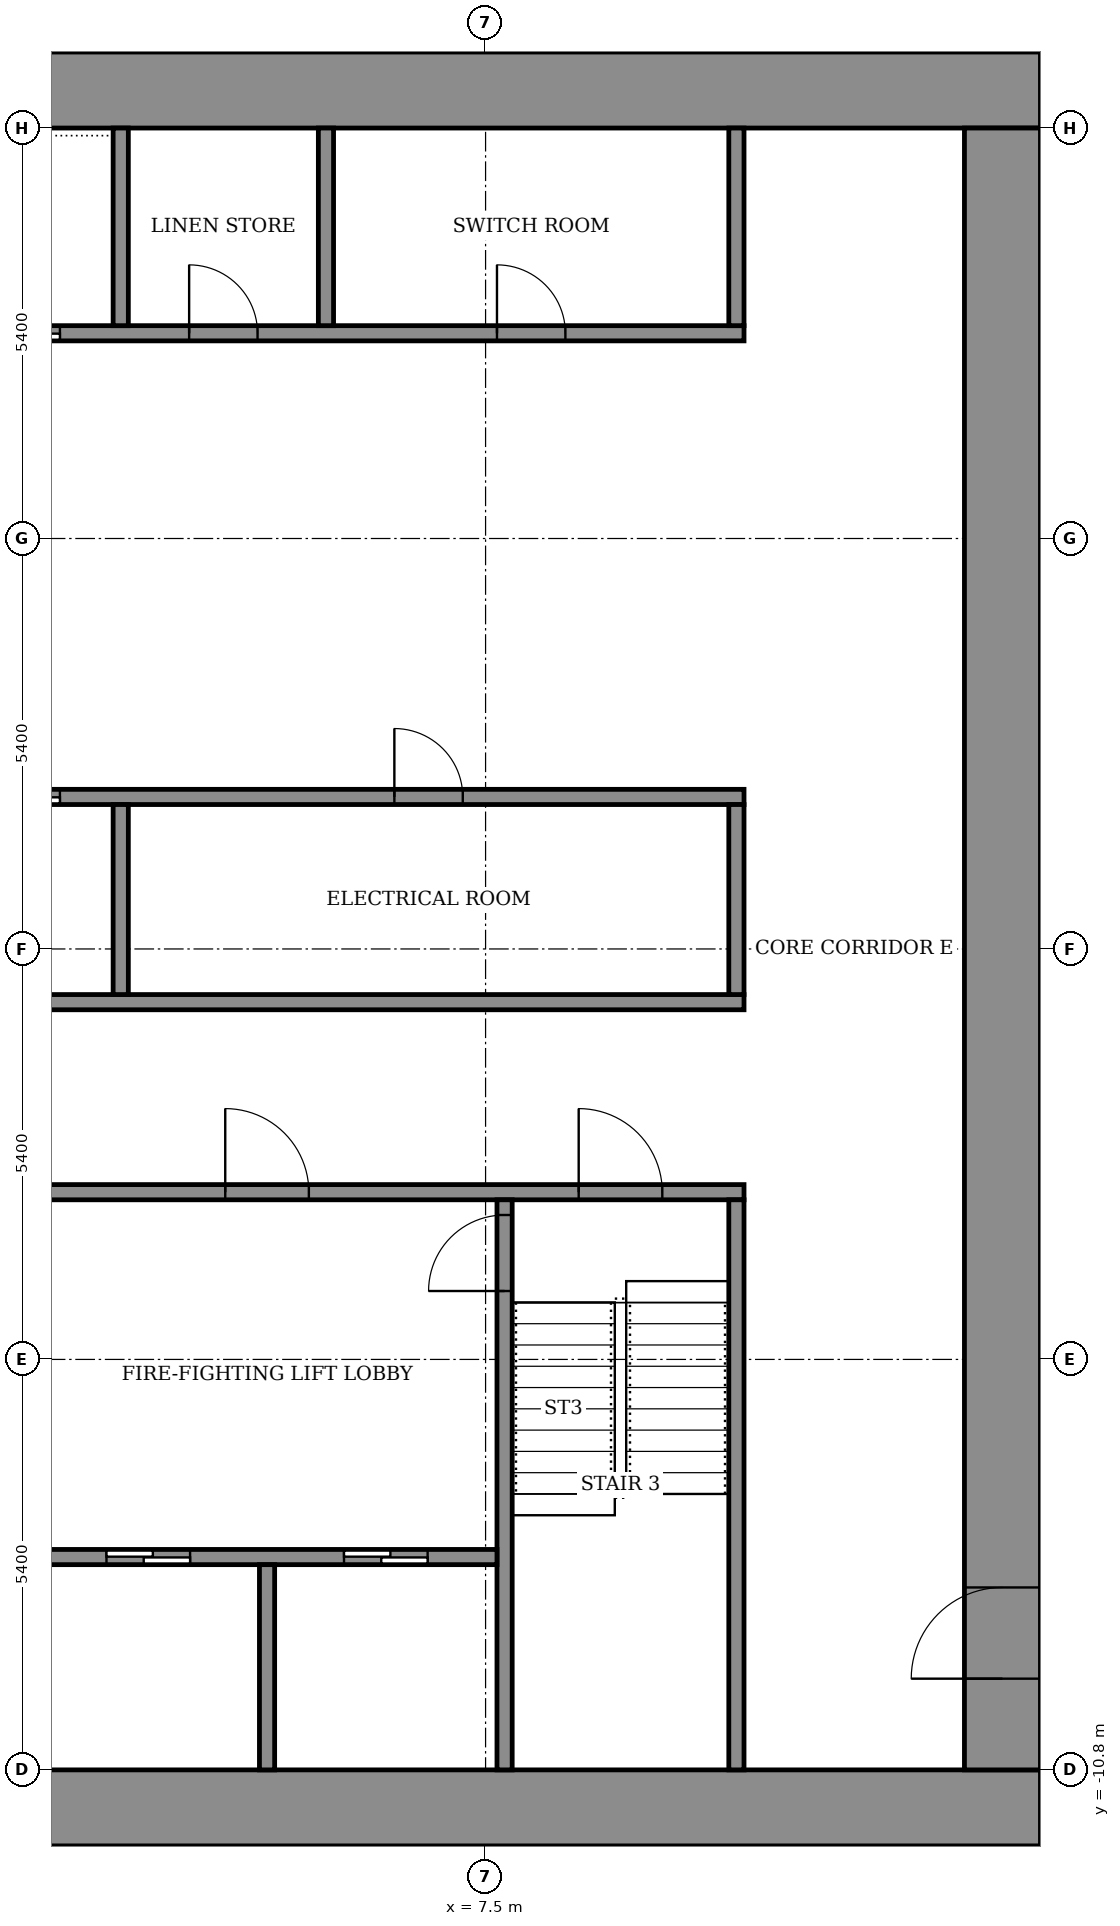
"""IFC4 building model, lengths in metres.
Left out: names, types, materials, properties, quantities, classifications, styles, units other than length and angle.
Written with IfcOpenShell. Run it as: python <this file> out.ifc"""

import sys

from ifc_helpers import new_model, si_unit, direction, frame, frame_2d, origin, place, context, subcontext, project, spatial, rectangle, extrude, element, fill, save


model = new_model("IFC4")
c1 = context("Model", 3, precision=1e-05, world=origin(), true_north=direction((0.0, 1.0)))
c2 = subcontext(c1, "Body", "Model", "MODEL_VIEW")
j1 = project(units=[si_unit("LENGTHUNIT", "METRE"), si_unit("PLANEANGLEUNIT", "RADIAN")], contexts=[c1])
p1 = place(None, origin())
s1 = spatial("IfcSite", under=j1, at=p1, CompositionType="ELEMENT")
p2 = place(p1, origin())
s2 = spatial("IfcBuilding", under=s1, at=p2, CompositionType="ELEMENT")
p3 = place(p2, frame((0.0, 0.0, 109.1)))
s3 = spatial("IfcBuildingStorey", under=s2, at=p3, CompositionType="ELEMENT", Elevation=109.1)
for number, where, z_axis, x_axis in (
    (1, (-14.8, -11.3, 0.0), (0.0, 0.0, 1.0), (1.0, 0.0, 0.0)),
    (2, (-14.8, 11.3, 0.0), (0.0, 0.0, 1.0), (1.0, 0.0, 0.0)),
):
    element("IfcWall", number, at=place(p3, frame(where, z_axis=z_axis, x_axis=x_axis)), inside=s3, PredefinedType="SHEAR", context=c2, shape_type="SweptSolid", body=[
        extrude(rectangle(XDim=29.6, YDim=1.0, at=frame_2d((14.8, 0.0))), origin(), (0.0, 0.0, 1.0), 3.6),
    ])
p4 = place(p3, frame((14.3, -10.8, 0.0), z_axis=(0.0, 0.0, 1.0), x_axis=(0.0, 1.0, 0.0)))
e3 = element("IfcWall", 3, at=p4, inside=s3, PredefinedType="SHEAR", context=c2, shape_type="SweptSolid", body=[
    extrude(rectangle(XDim=21.6, YDim=1.0, at=frame_2d((10.8, 0.0))), origin(), (0.0, 0.0, 1.0), 3.6),
])
p5 = place(p4, frame((1.2, 0.0, 0.0)))
e4 = element("IfcOpeningElement", 4, at=p5, cuts=e3, PredefinedType="OPENING", context=c2, shape_type="SweptSolid", body=[
    extrude(rectangle(XDim=1.2, YDim=2.1, at=frame_2d((0.6, 1.05))), frame((0.0, 0.51, 0.0), z_axis=(0.0, -1.0, 0.0), x_axis=(1.0, 0.0, 0.0)), (0.0, 0.0, 1.0), 1.02),
])
p6 = place(p3, frame((-10.9, -3.2, 0.0), z_axis=(0.0, 0.0, 1.0), x_axis=(1.0, 0.0, 0.0)))
e5 = element("IfcWall", 5, at=p6, inside=s3, PredefinedType="SHEAR", context=c2, shape_type="SweptSolid", body=[
    extrude(rectangle(XDim=21.8, YDim=0.2, at=frame_2d((10.9, 0.0))), origin(), (0.0, 0.0, 1.0), 3.05),
])
p7 = place(p6, frame((1.075, 0.0, 0.0)))
e6 = element("IfcOpeningElement", 6, at=p7, cuts=e5, PredefinedType="OPENING", context=c2, shape_type="SweptSolid", body=[
    extrude(rectangle(XDim=1.1, YDim=2.1, at=frame_2d((0.55, 1.05))), frame((0.0, 0.11, 0.0), z_axis=(0.0, -1.0, 0.0), x_axis=(1.0, 0.0, 0.0)), (0.0, 0.0, 1.0), 0.22),
])
p8 = place(p6, frame((10.325, 0.0, 0.0)))
e7 = element("IfcOpeningElement", 7, at=p8, cuts=e5, PredefinedType="OPENING", context=c2, shape_type="SweptSolid", body=[
    extrude(rectangle(XDim=1.1, YDim=2.1, at=frame_2d((0.55, 1.05))), frame((0.0, 0.11, 0.0), z_axis=(0.0, -1.0, 0.0), x_axis=(1.0, 0.0, 0.0)), (0.0, 0.0, 1.0), 0.22),
])
p9 = place(p6, frame((19.625, 0.0, 0.0)))
e8 = element("IfcOpeningElement", 8, at=p9, cuts=e5, PredefinedType="OPENING", context=c2, shape_type="SweptSolid", body=[
    extrude(rectangle(XDim=1.1, YDim=2.1, at=frame_2d((0.55, 1.05))), frame((0.0, 0.11, 0.0), z_axis=(0.0, -1.0, 0.0), x_axis=(1.0, 0.0, 0.0)), (0.0, 0.0, 1.0), 0.22),
])
p10 = place(p6, frame((5.7, 0.0, 0.0)))
e9 = element("IfcOpeningElement", 9, at=p10, cuts=e5, PredefinedType="OPENING", context=c2, shape_type="SweptSolid", body=[
    extrude(rectangle(XDim=1.1, YDim=2.1, at=frame_2d((0.55, 1.05))), frame((0.0, 0.11, 0.0), z_axis=(0.0, -1.0, 0.0), x_axis=(1.0, 0.0, 0.0)), (0.0, 0.0, 1.0), 0.22),
])
p11 = place(p6, frame((14.975, 0.0, 0.0)))
e10 = element("IfcOpeningElement", 10, at=p11, cuts=e5, PredefinedType="OPENING", context=c2, shape_type="SweptSolid", body=[
    extrude(rectangle(XDim=1.1, YDim=2.1, at=frame_2d((0.55, 1.05))), frame((0.0, 0.11, 0.0), z_axis=(0.0, -1.0, 0.0), x_axis=(1.0, 0.0, 0.0)), (0.0, 0.0, 1.0), 0.22),
])
p12 = place(p3, frame((-10.9, -0.7, 0.0), z_axis=(0.0, 0.0, 1.0), x_axis=(1.0, 0.0, 0.0)))
e11 = element("IfcWall", 11, at=p12, inside=s3, PredefinedType="SHEAR", context=c2, shape_type="SweptSolid", body=[
    extrude(rectangle(XDim=21.8, YDim=0.2, at=frame_2d((10.9, 0.0))), origin(), (0.0, 0.0, 1.0), 3.05),
])
p13 = place(p3, frame((-10.9, 2.0, 0.0), z_axis=(0.0, 0.0, 1.0), x_axis=(1.0, 0.0, 0.0)))
e12 = element("IfcWall", 12, at=p13, inside=s3, PredefinedType="SHEAR", context=c2, shape_type="SweptSolid", body=[
    extrude(rectangle(XDim=21.8, YDim=0.2, at=frame_2d((10.9, 0.0))), origin(), (0.0, 0.0, 1.0), 3.05),
])
p14 = place(p13, frame((0.9, 0.0, 0.0)))
e13 = element("IfcOpeningElement", 13, at=p14, cuts=e12, PredefinedType="OPENING", context=c2, shape_type="SweptSolid", body=[
    extrude(rectangle(XDim=1.1, YDim=2.1, at=frame_2d((0.55, 1.05))), frame((0.0, 0.11, 0.0), z_axis=(0.0, -1.0, 0.0), x_axis=(1.0, 0.0, 0.0)), (0.0, 0.0, 1.0), 0.22),
])
p15 = place(p13, frame((3.6, 0.0, 0.0)))
e14 = element("IfcOpeningElement", 14, at=p15, cuts=e12, PredefinedType="OPENING", context=c2, shape_type="SweptSolid", body=[
    extrude(rectangle(XDim=1.1, YDim=2.1, at=frame_2d((0.55, 1.05))), frame((0.0, 0.11, 0.0), z_axis=(0.0, -1.0, 0.0), x_axis=(1.0, 0.0, 0.0)), (0.0, 0.0, 1.0), 0.22),
])
p16 = place(p13, frame((6.3, 0.0, 0.0)))
e15 = element("IfcOpeningElement", 15, at=p16, cuts=e12, PredefinedType="OPENING", context=c2, shape_type="SweptSolid", body=[
    extrude(rectangle(XDim=1.1, YDim=2.1, at=frame_2d((0.55, 1.05))), frame((0.0, 0.11, 0.0), z_axis=(0.0, -1.0, 0.0), x_axis=(1.0, 0.0, 0.0)), (0.0, 0.0, 1.0), 0.22),
])
p17 = place(p13, frame((9.0, 0.0, 0.0)))
e16 = element("IfcOpeningElement", 16, at=p17, cuts=e12, PredefinedType="OPENING", context=c2, shape_type="SweptSolid", body=[
    extrude(rectangle(XDim=1.1, YDim=2.1, at=frame_2d((0.55, 1.05))), frame((0.0, 0.11, 0.0), z_axis=(0.0, -1.0, 0.0), x_axis=(1.0, 0.0, 0.0)), (0.0, 0.0, 1.0), 0.22),
])
p18 = place(p13, frame((11.7, 0.0, 0.0)))
e17 = element("IfcOpeningElement", 17, at=p18, cuts=e12, PredefinedType="OPENING", context=c2, shape_type="SweptSolid", body=[
    extrude(rectangle(XDim=1.1, YDim=2.1, at=frame_2d((0.55, 1.05))), frame((0.0, 0.11, 0.0), z_axis=(0.0, -1.0, 0.0), x_axis=(1.0, 0.0, 0.0)), (0.0, 0.0, 1.0), 0.22),
])
p19 = place(p13, frame((17.2, 0.0, 0.0)))
e18 = element("IfcOpeningElement", 18, at=p19, cuts=e12, PredefinedType="OPENING", context=c2, shape_type="SweptSolid", body=[
    extrude(rectangle(XDim=0.9, YDim=2.1, at=frame_2d((0.45, 1.05))), frame((0.0, 0.11, 0.0), z_axis=(0.0, -1.0, 0.0), x_axis=(1.0, 0.0, 0.0)), (0.0, 0.0, 1.0), 0.22),
])
p20 = place(p3, frame((-10.9, 8.1, 0.0), z_axis=(0.0, 0.0, 1.0), x_axis=(1.0, 0.0, 0.0)))
e19 = element("IfcWall", 19, at=p20, inside=s3, PredefinedType="SHEAR", context=c2, shape_type="SweptSolid", body=[
    extrude(rectangle(XDim=21.8, YDim=0.2, at=frame_2d((10.9, 0.0))), origin(), (0.0, 0.0, 1.0), 3.05),
])
p21 = place(p20, frame((0.9, 0.0, 0.0)))
e20 = element("IfcOpeningElement", 20, at=p21, cuts=e19, PredefinedType="OPENING", context=c2, shape_type="SweptSolid", body=[
    extrude(rectangle(XDim=1.1, YDim=2.1, at=frame_2d((0.55, 1.05))), frame((0.0, 0.11, 0.0), z_axis=(0.0, -1.0, 0.0), x_axis=(1.0, 0.0, 0.0)), (0.0, 0.0, 1.0), 0.22),
])
p22 = place(p20, frame((3.6, 0.0, 0.0)))
e21 = element("IfcOpeningElement", 21, at=p22, cuts=e19, PredefinedType="OPENING", context=c2, shape_type="SweptSolid", body=[
    extrude(rectangle(XDim=1.1, YDim=2.1, at=frame_2d((0.55, 1.05))), frame((0.0, 0.11, 0.0), z_axis=(0.0, -1.0, 0.0), x_axis=(1.0, 0.0, 0.0)), (0.0, 0.0, 1.0), 0.22),
])
p23 = place(p20, frame((6.3, 0.0, 0.0)))
e22 = element("IfcOpeningElement", 22, at=p23, cuts=e19, PredefinedType="OPENING", context=c2, shape_type="SweptSolid", body=[
    extrude(rectangle(XDim=1.1, YDim=2.1, at=frame_2d((0.55, 1.05))), frame((0.0, 0.11, 0.0), z_axis=(0.0, -1.0, 0.0), x_axis=(1.0, 0.0, 0.0)), (0.0, 0.0, 1.0), 0.22),
])
p24 = place(p20, frame((9.0, 0.0, 0.0)))
e23 = element("IfcOpeningElement", 23, at=p24, cuts=e19, PredefinedType="OPENING", context=c2, shape_type="SweptSolid", body=[
    extrude(rectangle(XDim=1.1, YDim=2.1, at=frame_2d((0.55, 1.05))), frame((0.0, 0.11, 0.0), z_axis=(0.0, -1.0, 0.0), x_axis=(1.0, 0.0, 0.0)), (0.0, 0.0, 1.0), 0.22),
])
p25 = place(p20, frame((11.7, 0.0, 0.0)))
e24 = element("IfcOpeningElement", 24, at=p25, cuts=e19, PredefinedType="OPENING", context=c2, shape_type="SweptSolid", body=[
    extrude(rectangle(XDim=1.1, YDim=2.1, at=frame_2d((0.55, 1.05))), frame((0.0, 0.11, 0.0), z_axis=(0.0, -1.0, 0.0), x_axis=(1.0, 0.0, 0.0)), (0.0, 0.0, 1.0), 0.22),
])
p26 = place(p20, frame((14.5, 0.0, 0.0)))
e25 = element("IfcOpeningElement", 25, at=p26, cuts=e19, PredefinedType="OPENING", context=c2, shape_type="SweptSolid", body=[
    extrude(rectangle(XDim=0.9, YDim=2.1, at=frame_2d((0.45, 1.05))), frame((0.0, 0.11, 0.0), z_axis=(0.0, -1.0, 0.0), x_axis=(1.0, 0.0, 0.0)), (0.0, 0.0, 1.0), 0.22),
])
p27 = place(p20, frame((18.55, 0.0, 0.0)))
e26 = element("IfcOpeningElement", 26, at=p27, cuts=e19, PredefinedType="OPENING", context=c2, shape_type="SweptSolid", body=[
    extrude(rectangle(XDim=0.9, YDim=2.1, at=frame_2d((0.45, 1.05))), frame((0.0, 0.11, 0.0), z_axis=(0.0, -1.0, 0.0), x_axis=(1.0, 0.0, 0.0)), (0.0, 0.0, 1.0), 0.22),
])
p28 = place(p3, frame((7.75, -10.8, 0.0), z_axis=(0.0, 0.0, 1.0), x_axis=(0.0, 1.0, 0.0)))
e27 = element("IfcWall", 27, at=p28, inside=s3, PredefinedType="SHEAR", context=c2, shape_type="SweptSolid", body=[
    extrude(rectangle(XDim=7.5, YDim=0.2, at=frame_2d((3.75, 0.0))), origin(), (0.0, 0.0, 1.0), 3.05),
])
p29 = place(p28, frame((6.3, 0.0, 0.0)))
e28 = element("IfcOpeningElement", 28, at=p29, cuts=e27, PredefinedType="OPENING", context=c2, shape_type="SweptSolid", body=[
    extrude(rectangle(XDim=1.0, YDim=2.1, at=frame_2d((0.5, 1.05))), frame((0.0, 0.11, 0.0), z_axis=(0.0, -1.0, 0.0), x_axis=(1.0, 0.0, 0.0)), (0.0, 0.0, 1.0), 0.22),
])
p30 = place(p3, frame((10.8, -10.8, 0.0), z_axis=(0.0, 0.0, 1.0), x_axis=(0.0, 1.0, 0.0)))
e29 = element("IfcWall", 29, at=p30, inside=s3, PredefinedType="SHEAR", context=c2, shape_type="SweptSolid", body=[
    extrude(rectangle(XDim=7.5, YDim=0.2, at=frame_2d((3.75, 0.0))), origin(), (0.0, 0.0, 1.0), 3.05),
])
p31 = place(p3, frame((1.6, -8.0, 0.0), z_axis=(0.0, 0.0, 1.0), x_axis=(1.0, 0.0, 0.0)))
e30 = element("IfcWall", 30, at=p31, inside=s3, PredefinedType="SHEAR", context=c2, shape_type="SweptSolid", body=[
    extrude(rectangle(XDim=6.05, YDim=0.2, at=frame_2d((3.025, 0.0))), origin(), (0.0, 0.0, 1.0), 3.05),
])
p32 = place(p31, frame((0.913, 0.0, 0.0)))
e31 = element("IfcOpeningElement", 31, at=p32, cuts=e30, PredefinedType="OPENING", context=c2, shape_type="SweptSolid", body=[
    extrude(rectangle(XDim=1.1, YDim=2.1, at=frame_2d((0.55, 1.05))), frame((0.0, 0.11, 0.0), z_axis=(0.0, -1.0, 0.0), x_axis=(1.0, 0.0, 0.0)), (0.0, 0.0, 1.0), 0.22),
])
p33 = place(p31, frame((4.038, 0.0, 0.0)))
e32 = element("IfcOpeningElement", 32, at=p33, cuts=e30, PredefinedType="OPENING", context=c2, shape_type="SweptSolid", body=[
    extrude(rectangle(XDim=1.1, YDim=2.1, at=frame_2d((0.55, 1.05))), frame((0.0, 0.11, 0.0), z_axis=(0.0, -1.0, 0.0), x_axis=(1.0, 0.0, 0.0)), (0.0, 0.0, 1.0), 0.22),
])
p34 = place(p3, frame((4.625, -10.8, 0.0), z_axis=(0.0, 0.0, 1.0), x_axis=(0.0, 1.0, 0.0)))
e33 = element("IfcWall", 33, at=p34, inside=s3, PredefinedType="SHEAR", context=c2, shape_type="SweptSolid", body=[
    extrude(rectangle(XDim=2.7, YDim=0.2, at=frame_2d((1.35, 0.0))), origin(), (0.0, 0.0, 1.0), 3.05),
])
p35 = place(p3, frame((2.7, -0.6, 0.0), z_axis=(0.0, 0.0, 1.0), x_axis=(0.0, 1.0, 0.0)))
e34 = element("IfcWall", 34, at=p35, inside=s3, PredefinedType="SHEAR", context=c2, shape_type="SweptSolid", body=[
    extrude(rectangle(XDim=2.5, YDim=0.2, at=frame_2d((1.25, 0.0))), origin(), (0.0, 0.0, 1.0), 3.05),
])
p36 = place(p3, frame((10.8, -0.6, 0.0), z_axis=(0.0, 0.0, 1.0), x_axis=(0.0, 1.0, 0.0)))
e35 = element("IfcWall", 35, at=p36, inside=s3, PredefinedType="STANDARD", context=c2, shape_type="SweptSolid", body=[
    extrude(rectangle(XDim=2.5, YDim=0.2, at=frame_2d((1.25, 0.0))), origin(), (0.0, 0.0, 1.0), 3.05),
])
p37 = place(p3, frame((2.7, 8.2, 0.0), z_axis=(0.0, 0.0, 1.0), x_axis=(0.0, 1.0, 0.0)))
e36 = element("IfcWall", 36, at=p37, inside=s3, PredefinedType="SHEAR", context=c2, shape_type="SweptSolid", body=[
    extrude(rectangle(XDim=2.6, YDim=0.2, at=frame_2d((1.3, 0.0))), origin(), (0.0, 0.0, 1.0), 3.05),
])
for number, where, z_axis, x_axis in (
    (37, (5.4, 8.2, 0.0), (0.0, 0.0, 1.0), (0.0, 1.0, 0.0)),
    (38, (10.8, 8.2, 0.0), (0.0, 0.0, 1.0), (0.0, 1.0, 0.0)),
):
    element("IfcWall", number, at=place(p3, frame(where, z_axis=z_axis, x_axis=x_axis)), inside=s3, PredefinedType="STANDARD", context=c2, shape_type="SweptSolid", body=[
        extrude(rectangle(XDim=2.6, YDim=0.2, at=frame_2d((1.3, 0.0))), origin(), (0.0, 0.0, 1.0), 3.05),
    ])
p38 = place(p5, origin())
e39 = element("IfcDoor", 39, at=p38, inside=s3, OperationType="DOUBLE_DOOR_SINGLE_SWING", PredefinedType="DOOR", context=c2, shape_type="SweptSolid", body=[
    extrude(rectangle(XDim=1.2, YDim=2.1, at=frame_2d((0.6, 1.05))), frame((0.0, 0.025, 0.0), z_axis=(0.0, -1.0, 0.0), x_axis=(1.0, 0.0, 0.0)), (0.0, 0.0, 1.0), 0.05),
])
fill(e4, e39)
p39 = place(p18, origin())
e40 = element("IfcDoor", 40, at=p39, inside=s3, OperationType="SLIDING_TO_LEFT", PredefinedType="DOOR", context=c2, shape_type="SweptSolid", body=[
    extrude(rectangle(XDim=1.1, YDim=2.1, at=frame_2d((0.55, 1.05))), frame((0.0, 0.025, 0.0), z_axis=(0.0, -1.0, 0.0), x_axis=(1.0, 0.0, 0.0)), (0.0, 0.0, 1.0), 0.05),
])
fill(e17, e40)
p40 = place(p25, origin())
e41 = element("IfcDoor", 41, at=p40, inside=s3, OperationType="SLIDING_TO_LEFT", PredefinedType="DOOR", context=c2, shape_type="SweptSolid", body=[
    extrude(rectangle(XDim=1.1, YDim=2.1, at=frame_2d((0.55, 1.05))), frame((0.0, 0.025, 0.0), z_axis=(0.0, -1.0, 0.0), x_axis=(1.0, 0.0, 0.0)), (0.0, 0.0, 1.0), 0.05),
])
fill(e24, e41)
p41 = place(p19, origin())
e42 = element("IfcDoor", 42, at=p41, inside=s3, OperationType="SINGLE_SWING_LEFT", PredefinedType="DOOR", context=c2, shape_type="SweptSolid", body=[
    extrude(rectangle(XDim=0.9, YDim=2.1, at=frame_2d((0.45, 1.05))), frame((0.0, 0.025, 0.0), z_axis=(0.0, -1.0, 0.0), x_axis=(1.0, 0.0, 0.0)), (0.0, 0.0, 1.0), 0.05),
])
fill(e18, e42)
p42 = place(p26, origin())
e43 = element("IfcDoor", 43, at=p42, inside=s3, OperationType="SINGLE_SWING_RIGHT", PredefinedType="DOOR", context=c2, shape_type="SweptSolid", body=[
    extrude(rectangle(XDim=0.9, YDim=2.1, at=frame_2d((0.45, 1.05))), frame((0.0, 0.025, 0.0), z_axis=(0.0, -1.0, 0.0), x_axis=(1.0, 0.0, 0.0)), (0.0, 0.0, 1.0), 0.05),
])
fill(e25, e43)
p43 = place(p27, origin())
e44 = element("IfcDoor", 44, at=p43, inside=s3, OperationType="SINGLE_SWING_LEFT", PredefinedType="DOOR", context=c2, shape_type="SweptSolid", body=[
    extrude(rectangle(XDim=0.9, YDim=2.1, at=frame_2d((0.45, 1.05))), frame((0.0, 0.025, 0.0), z_axis=(0.0, -1.0, 0.0), x_axis=(1.0, 0.0, 0.0)), (0.0, 0.0, 1.0), 0.05),
])
fill(e26, e44)
p44 = place(p32, origin())
e45 = element("IfcDoor", 45, at=p44, inside=s3, OperationType="SLIDING_TO_LEFT", PredefinedType="DOOR", context=c2, shape_type="SweptSolid", body=[
    extrude(rectangle(XDim=1.1, YDim=2.1, at=frame_2d((0.55, 1.05))), frame((0.0, 0.025, 0.0), z_axis=(0.0, -1.0, 0.0), x_axis=(1.0, 0.0, 0.0)), (0.0, 0.0, 1.0), 0.05),
])
fill(e31, e45)
p45 = place(p33, origin())
e46 = element("IfcDoor", 46, at=p45, inside=s3, OperationType="SLIDING_TO_LEFT", PredefinedType="DOOR", context=c2, shape_type="SweptSolid", body=[
    extrude(rectangle(XDim=1.1, YDim=2.1, at=frame_2d((0.55, 1.05))), frame((0.0, 0.025, 0.0), z_axis=(0.0, -1.0, 0.0), x_axis=(1.0, 0.0, 0.0)), (0.0, 0.0, 1.0), 0.05),
])
fill(e32, e46)
p46 = place(p9, origin())
e47 = element("IfcDoor", 47, at=p46, inside=s3, OperationType="SINGLE_SWING_RIGHT", PredefinedType="DOOR", context=c2, shape_type="SweptSolid", body=[
    extrude(rectangle(XDim=1.1, YDim=2.1, at=frame_2d((0.55, 1.05))), frame((0.0, 0.025, 0.0), z_axis=(0.0, -1.0, 0.0), x_axis=(1.0, 0.0, 0.0)), (0.0, 0.0, 1.0), 0.05),
])
fill(e8, e47)
p47 = place(p11, origin())
e48 = element("IfcDoor", 48, at=p47, inside=s3, OperationType="SINGLE_SWING_LEFT", PredefinedType="DOOR", context=c2, shape_type="SweptSolid", body=[
    extrude(rectangle(XDim=1.1, YDim=2.1, at=frame_2d((0.55, 1.05))), frame((0.0, 0.025, 0.0), z_axis=(0.0, -1.0, 0.0), x_axis=(1.0, 0.0, 0.0)), (0.0, 0.0, 1.0), 0.05),
])
fill(e10, e48)
p48 = place(p29, origin())
e49 = element("IfcDoor", 49, at=p48, inside=s3, OperationType="SINGLE_SWING_RIGHT", PredefinedType="DOOR", context=c2, shape_type="SweptSolid", body=[
    extrude(rectangle(XDim=1.0, YDim=2.1, at=frame_2d((0.5, 1.05))), frame((0.0, 0.025, 0.0), z_axis=(0.0, -1.0, 0.0), x_axis=(1.0, 0.0, 0.0)), (0.0, 0.0, 1.0), 0.05),
])
fill(e28, e49)
save(model, sys.argv[1])
